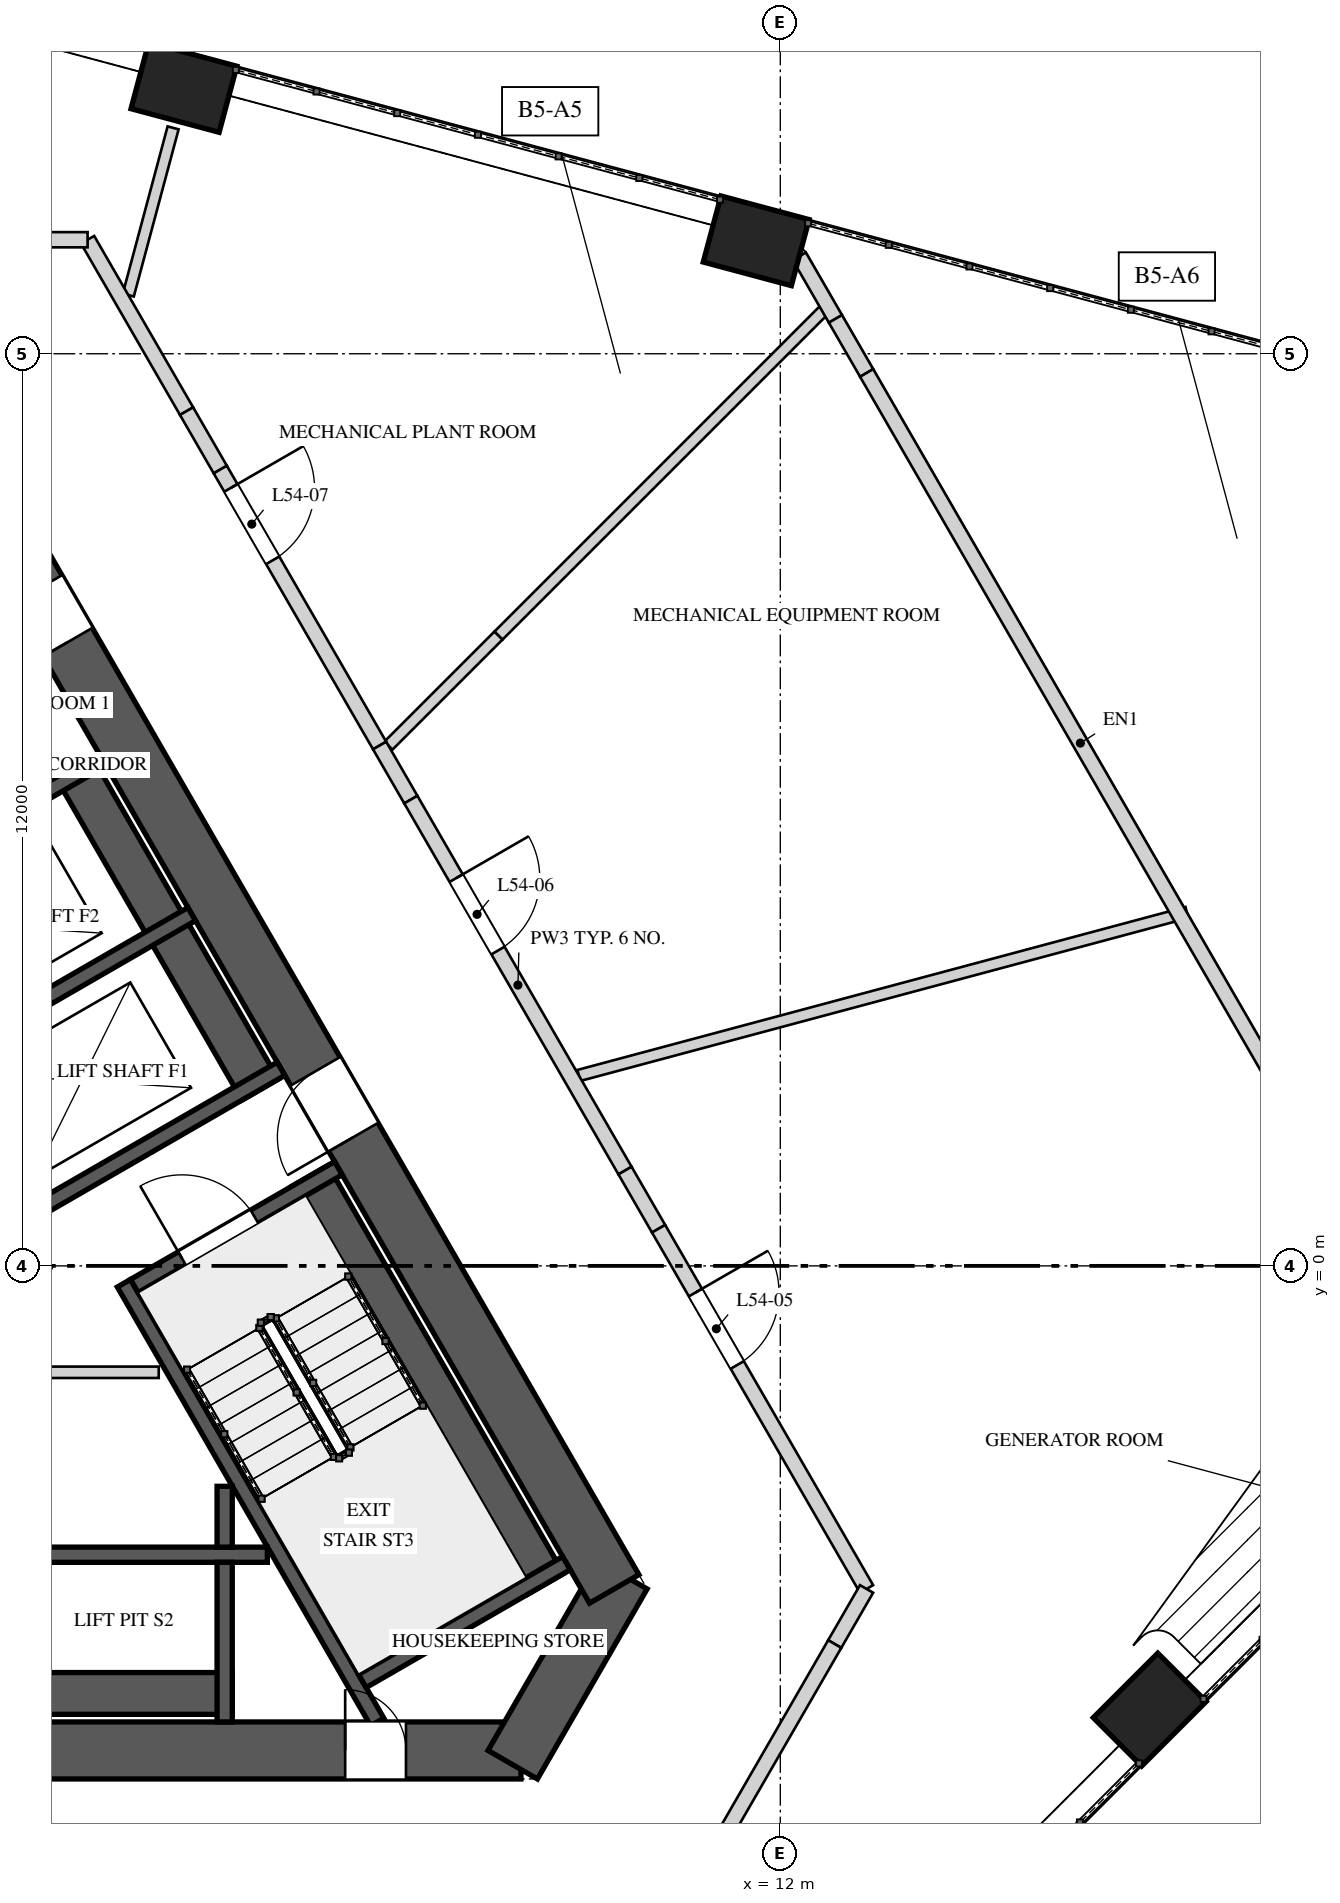
"""IFC4 building model, lengths in metres.
Left out: names, types, materials, properties, quantities, classifications, styles, units other than length and angle.
Written with IfcOpenShell. Run it as: python <this file> out.ifc"""

import sys

from ifc_helpers import new_model, si_unit, direction, frame, frame_2d, origin, origin_2d, place, context, subcontext, project, spatial, rectangle, extrude, element, fill, save


model = new_model("IFC4")
c1 = context("Model", 3, precision=1e-05, world=origin(), true_north=direction((0.0, 1.0)))
c2 = subcontext(c1, "Body", "Model", "MODEL_VIEW")
j1 = project(units=[si_unit("LENGTHUNIT", "METRE"), si_unit("PLANEANGLEUNIT", "RADIAN")], contexts=[c1])
p1 = place(None, origin())
s1 = spatial("IfcSite", under=j1, at=p1, CompositionType="ELEMENT")
p2 = place(p1, origin())
s2 = spatial("IfcBuilding", under=s1, at=p2, CompositionType="ELEMENT")
p3 = place(p2, frame((0.0, 0.0, 232.0)))
s3 = spatial("IfcBuildingStorey", under=s2, at=p3, CompositionType="ELEMENT", Elevation=232.0)
p4 = place(p3, frame((-8.588, -6.375, 0.0), z_axis=(0.0, 0.0, 1.0), x_axis=(1.0, 0.0, 0.0)))
e1 = element("IfcWall", 1, at=p4, inside=s3, PredefinedType="SHEAR", context=c2, shape_type="SweptSolid", body=[
    extrude(rectangle(XDim=17.176, YDim=0.75, at=frame_2d((8.588, 0.0))), origin(), (0.0, 0.0, 1.0), 5.2),
])
p5 = place(p4, frame((6.793, 0.0, 0.0)))
e2 = element("IfcOpeningElement", 2, at=p5, cuts=e1, PredefinedType="OPENING", context=c2, shape_type="SweptSolid", body=[
    extrude(rectangle(XDim=1.0, YDim=2.4, at=frame_2d((0.5, 1.2))), frame((0.0, 0.385, 0.0), z_axis=(0.0, -1.0, 0.0), x_axis=(1.0, 0.0, 0.0)), (0.0, 0.0, 1.0), 0.77),
])
p6 = place(p4, frame((14.864, 0.0, 0.0)))
e3 = element("IfcOpeningElement", 3, at=p6, cuts=e1, PredefinedType="OPENING", context=c2, shape_type="SweptSolid", body=[
    extrude(rectangle(XDim=0.8, YDim=2.1, at=frame_2d((0.4, 1.05))), frame((0.0, 0.385, 0.0), z_axis=(0.0, -1.0, 0.0), x_axis=(1.0, 0.0, 0.0)), (0.0, 0.0, 1.0), 0.77),
])
p7 = place(p3, frame((8.48, -6.562, 0.0), z_axis=(0.0, 0.0, 1.0), x_axis=(0.499995765644, 0.866027848477, 0.0)))
e4 = element("IfcWall", 4, at=p7, inside=s3, PredefinedType="SHEAR", context=c2, shape_type="SweptSolid", body=[
    extrude(rectangle(XDim=2.887, YDim=0.75, at=frame_2d((1.443, 0.0))), origin(), (0.0, 0.0, 1.0), 5.2),
])
p8 = place(p3, frame((9.815, -4.25, 0.0), z_axis=(0.0, 0.0, 1.0), x_axis=(-0.500002161919, 0.866024155596, 0.0)))
e5 = element("IfcWall", 5, at=p8, inside=s3, PredefinedType="SHEAR", context=c2, shape_type="SweptSolid", body=[
    extrude(rectangle(XDim=17.176, YDim=0.75, at=frame_2d((8.588, 0.0))), origin(), (0.0, 0.0, 1.0), 5.2),
])
p9 = place(p8, frame((6.863, 0.0, 0.0)))
e6 = element("IfcOpeningElement", 6, at=p9, cuts=e5, PredefinedType="OPENING", context=c2, shape_type="SweptSolid", body=[
    extrude(rectangle(XDim=1.0, YDim=2.4, at=frame_2d((0.5, 1.2))), frame((0.0, 0.385, 0.0), z_axis=(0.0, -1.0, 0.0), x_axis=(1.0, 0.0, 0.0)), (0.0, 0.0, 1.0), 0.77),
])
p10 = place(p8, frame((14.382, 0.0, 0.0)))
e7 = element("IfcOpeningElement", 7, at=p10, cuts=e5, PredefinedType="OPENING", context=c2, shape_type="SweptSolid", body=[
    extrude(rectangle(XDim=0.8, YDim=2.1, at=frame_2d((0.4, 1.05))), frame((0.0, 0.385, 0.0), z_axis=(0.0, -1.0, 0.0), x_axis=(1.0, 0.0, 0.0)), (0.0, 0.0, 1.0), 0.77),
])
for number, where, z_axis, x_axis in (
    (8, (16.86, -5.838, 0.0), (0.0, 0.0, 1.0), (0.707, 0.707, 0.0)),
    (9, (11.683, 13.486, 0.0), (0.0, 0.0, 1.0), (-0.966, 0.259, 0.0)),
    (10, (4.154, 15.503, 0.0), (0.0, 0.0, 1.0), (-0.966, 0.259, 0.0)),
):
    element("IfcColumn", number, at=place(p3, frame(where, z_axis=z_axis, x_axis=x_axis)), inside=s3, PredefinedType="COLUMN", context=c2, shape_type="SweptSolid", body=[
        extrude(rectangle(XDim=1.2, YDim=0.9, at=origin_2d()), origin(), (0.0, 0.0, 1.0), 2.806),
    ])
p11 = place(p3, frame((8.911, -4.185, 0.0), z_axis=(0.0, 0.0, 1.0), x_axis=(-0.500009909098, 0.866019682689, 0.0)))
e11 = element("IfcWall", 11, at=p11, inside=s3, PredefinedType="SOLIDWALL", context=c2, shape_type="SweptSolid", body=[
    extrude(rectangle(XDim=6.2, YDim=0.55, at=frame_2d((3.1, 0.0))), origin(), (0.0, 0.0, 1.0), 4.85),
])
p12 = place(p3, frame((6.697, -6.0, 0.0), z_axis=(0.0, 0.0, 1.0), x_axis=(-0.499980354584, 0.866036745774, 0.0)))
e12 = element("IfcWall", 12, at=p12, inside=s3, PredefinedType="SOLIDWALL", context=c2, shape_type="SweptSolid", body=[
    extrude(rectangle(XDim=6.665, YDim=0.2, at=frame_2d((3.333, 0.0))), origin(), (0.0, 0.0, 1.0), 4.85),
])
p13 = place(p3, frame((6.501, -5.461, 0.0), z_axis=(0.0, 0.0, 1.0), x_axis=(0.86600983753, 0.500026960575, 0.0)))
e13 = element("IfcWall", 13, at=p13, inside=s3, PredefinedType="SOLIDWALL", context=c2, shape_type="SweptSolid", body=[
    extrude(rectangle(XDim=3.1, YDim=0.2, at=frame_2d((1.55, 0.0))), origin(), (0.0, 0.0, 1.0), 4.85),
])
p14 = place(p3, frame((3.501, -0.265, 0.0), z_axis=(0.0, 0.0, 1.0), x_axis=(0.866043940782, 0.499967891604, 0.0)))
e14 = element("IfcWall", 14, at=p14, inside=s3, PredefinedType="SOLIDWALL", context=c2, shape_type="SweptSolid", body=[
    extrude(rectangle(XDim=3.1, YDim=0.2, at=frame_2d((1.55, 0.0))), origin(), (0.0, 0.0, 1.0), 4.85),
])
p15 = place(p14, frame((0.725, 0.0, 0.0)))
e15 = element("IfcOpeningElement", 15, at=p15, cuts=e14, PredefinedType="OPENING", context=c2, shape_type="SweptSolid", body=[
    extrude(rectangle(XDim=1.1, YDim=2.4, at=frame_2d((0.55, 1.2))), frame((0.0, 0.11, 0.0), z_axis=(0.0, -1.0, 0.0), x_axis=(1.0, 0.0, 0.0)), (0.0, 0.0, 1.0), 0.22),
])
p16 = place(p3, frame((-0.71, -3.8, 0.0), z_axis=(0.0, 0.0, 1.0), x_axis=(1.0, 0.0, 0.0)))
e16 = element("IfcWall", 16, at=p16, inside=s3, PredefinedType="SOLIDWALL", context=c2, shape_type="SweptSolid", body=[
    extrude(rectangle(XDim=5.961, YDim=0.2, at=frame_2d((2.981, 0.0))), origin(), (0.0, 0.0, 1.0), 4.85),
])
p17 = place(p3, frame((-0.71, -5.625, 0.0), z_axis=(0.0, 0.0, 1.0), x_axis=(1.0, 0.0, 0.0)))
e17 = element("IfcWall", 17, at=p17, inside=s3, PredefinedType="SOLIDWALL", context=c2, shape_type="SweptSolid", body=[
    extrude(rectangle(XDim=5.5, YDim=0.55, at=frame_2d((2.75, 0.0))), origin(), (0.0, 0.0, 1.0), 4.85),
])
p18 = place(p3, frame((4.69, -3.9, 0.0), z_axis=(0.0, 0.0, 1.0), x_axis=(0.0, -1.0, 0.0)))
e18 = element("IfcWall", 18, at=p18, inside=s3, PredefinedType="SOLIDWALL", context=c2, shape_type="SweptSolid", body=[
    extrude(rectangle(XDim=2.1, YDim=0.2, at=frame_2d((1.05, 0.0))), origin(), (0.0, 0.0, 1.0), 4.85),
])
p19 = place(p3, frame((4.69, -2.9, 0.0), z_axis=(0.0, 0.0, 1.0), x_axis=(0.0, -1.0, 0.0)))
e19 = element("IfcWall", 19, at=p19, inside=s3, PredefinedType="SOLIDWALL", context=c2, shape_type="SweptSolid", body=[
    extrude(rectangle(XDim=0.8, YDim=0.2, at=frame_2d((0.4, 0.0))), origin(), (0.0, 0.0, 1.0), 4.85),
])
p20 = place(p3, frame((5.156, 2.319, 0.0), z_axis=(0.0, 0.0, 1.0), x_axis=(-0.500018594424, 0.866014668023, 0.0)))
e20 = element("IfcWall", 20, at=p20, inside=s3, PredefinedType="SOLIDWALL", context=c2, shape_type="SweptSolid", body=[
    extrude(rectangle(XDim=4.9, YDim=0.55, at=frame_2d((2.45, 0.0))), origin(), (0.0, 0.0, 1.0), 4.85),
])
for number, where, z_axis, x_axis in (
    (21, (2.227, 0.743, 0.0), (0.0, 0.0, 1.0), (0.866, 0.5, 0.0)),
    (22, (1.052, 2.778, 0.0), (0.0, 0.0, 1.0), (0.866, 0.5, 0.0)),
):
    element("IfcWall", number, at=place(p3, frame(where, z_axis=z_axis, x_axis=x_axis)), inside=s3, PredefinedType="SOLIDWALL", context=c2, shape_type="SweptSolid", body=[
        extrude(rectangle(XDim=3.7, YDim=0.2, at=frame_2d((1.85, 0.0))), origin(), (0.0, 0.0, 1.0), 4.85),
    ])
p21 = place(p3, frame((-0.123, 4.813, 0.0), z_axis=(0.0, 0.0, 1.0), x_axis=(0.866000971088, 0.500042316284, 0.0)))
e23 = element("IfcWall", 23, at=p21, inside=s3, PredefinedType="SOLIDWALL", context=c2, shape_type="SweptSolid", body=[
    extrude(rectangle(XDim=3.7, YDim=0.2, at=frame_2d((1.85, 0.0))), origin(), (0.0, 0.0, 1.0), 4.85),
])
p22 = place(p3, frame((-4.053, -1.4, 0.0), z_axis=(0.0, 0.0, 1.0), x_axis=(1.0, 0.0, 0.0)))
e24 = element("IfcWall", 24, at=p22, inside=s3, PredefinedType="PARTITIONING", context=c2, shape_type="SweptSolid", body=[
    extrude(rectangle(XDim=7.876, YDim=0.15, at=frame_2d((3.938, 0.0))), origin(), (0.0, 0.0, 1.0), 4.85),
])
p23 = place(p3, frame((3.422, 12.772, 0.0), z_axis=(0.0, 0.0, 1.0), x_axis=(0.258796817064, 0.965931782, 0.0)))
e25 = element("IfcWall", 25, at=p23, inside=s3, PredefinedType="PARTITIONING", context=c2, shape_type="SweptSolid", body=[
    extrude(rectangle(XDim=2.277, YDim=0.15, at=frame_2d((1.139, 0.0))), origin(), (0.0, 0.0, 1.0), 4.85),
])
p24 = place(p3, frame((6.845, 6.845, 0.0), z_axis=(0.0, 0.0, 1.0), x_axis=(0.707106781187, 0.707106781187, 0.0)))
e26 = element("IfcWall", 26, at=p24, inside=s3, PredefinedType="PARTITIONING", context=c2, shape_type="SweptSolid", body=[
    extrude(rectangle(XDim=2.049, YDim=0.15, at=frame_2d((1.024, 0.0))), origin(), (0.0, 0.0, 1.0), 3.95),
])
p25 = place(p3, frame((8.293, 8.293, 0.0), z_axis=(0.0, 0.0, 1.0), x_axis=(0.707106781187, 0.707106781187, 0.0)))
e27 = element("IfcWall", 27, at=p25, inside=s3, PredefinedType="PARTITIONING", context=c2, shape_type="SweptSolid", body=[
    extrude(rectangle(XDim=6.17, YDim=0.15, at=frame_2d((3.085, 0.0))), origin(), (0.0, 0.0, 1.0), 4.85),
])
p26 = place(p3, frame((9.35, 2.505, 0.0), z_axis=(0.0, 0.0, 1.0), x_axis=(0.965925024381, 0.258822037845, 0.0)))
e28 = element("IfcWall", 28, at=p26, inside=s3, PredefinedType="PARTITIONING", context=c2, shape_type="SweptSolid", body=[
    extrude(rectangle(XDim=8.282, YDim=0.15, at=frame_2d((4.141, 0.0))), origin(), (0.0, 0.0, 1.0), 4.85),
])
p27 = place(p3, frame((2.887, 13.5, 0.0), z_axis=(0.0, 0.0, 1.0), x_axis=(0.500001094379, -0.866024771944, 0.0)))
e29 = element("IfcWall", 29, at=p27, inside=s3, PredefinedType="SOLIDWALL", context=c2, shape_type="SweptSolid", body=[
    extrude(rectangle(XDim=2.604, YDim=0.2, at=frame_2d((1.302, 0.0))), origin(), (0.0, 0.0, 1.0), 4.85),
])
p28 = place(p3, frame((4.189, 11.245, 0.0), z_axis=(0.0, 0.0, 1.0), x_axis=(0.500016243463, -0.866016025414, 0.0)))
e30 = element("IfcWall", 30, at=p28, inside=s3, PredefinedType="SOLIDWALL", context=c2, shape_type="SweptSolid", body=[
    extrude(rectangle(XDim=0.887, YDim=0.2, at=frame_2d((0.444, 0.0))), origin(), (0.0, 0.0, 1.0), 4.15),
])
p29 = place(p3, frame((4.632, 10.477, 0.0), z_axis=(0.0, 0.0, 1.0), x_axis=(0.499984573973, -0.866034309822, 0.0)))
e31 = element("IfcWall", 31, at=p29, inside=s3, PredefinedType="SOLIDWALL", context=c2, shape_type="SweptSolid", body=[
    extrude(rectangle(XDim=4.193, YDim=0.2, at=frame_2d((2.096, 0.0))), origin(), (0.0, 0.0, 1.0), 4.85),
])
p30 = place(p29, frame((0.279, 0.0, 0.0)))
e32 = element("IfcOpeningElement", 32, at=p30, cuts=e31, PredefinedType="OPENING", context=c2, shape_type="SweptSolid", body=[
    extrude(rectangle(XDim=1.1, YDim=2.2, at=frame_2d((0.55, 1.1))), frame((0.0, 0.11, 0.0), z_axis=(0.0, -1.0, 0.0), x_axis=(1.0, 0.0, 0.0)), (0.0, 0.0, 1.0), 0.22),
])
p31 = place(p3, frame((6.729, 6.846, 0.0), z_axis=(0.0, 0.0, 1.0), x_axis=(0.500039835994, -0.866002403241, 0.0)))
e33 = element("IfcWall", 33, at=p31, inside=s3, PredefinedType="SOLIDWALL", context=c2, shape_type="SweptSolid", body=[
    extrude(rectangle(XDim=0.821, YDim=0.2, at=frame_2d((0.411, 0.0))), origin(), (0.0, 0.0, 1.0), 3.95),
])
p32 = place(p3, frame((7.139, 6.135, 0.0), z_axis=(0.0, 0.0, 1.0), x_axis=(0.500006198144, -0.866021825255, 0.0)))
e34 = element("IfcWall", 34, at=p32, inside=s3, PredefinedType="SOLIDWALL", context=c2, shape_type="SweptSolid", body=[
    extrude(rectangle(XDim=5.636, YDim=0.2, at=frame_2d((2.818, 0.0))), origin(), (0.0, 0.0, 1.0), 4.85),
])
p33 = place(p32, frame((1.193, 0.0, 0.0)))
e35 = element("IfcOpeningElement", 35, at=p33, cuts=e34, PredefinedType="OPENING", context=c2, shape_type="SweptSolid", body=[
    extrude(rectangle(XDim=1.1, YDim=2.2, at=frame_2d((0.55, 1.1))), frame((0.0, 0.11, 0.0), z_axis=(0.0, -1.0, 0.0), x_axis=(1.0, 0.0, 0.0)), (0.0, 0.0, 1.0), 0.22),
])
p34 = place(p3, frame((9.957, 1.254, 0.0), z_axis=(0.0, 0.0, 1.0), x_axis=(0.499913830031, -0.866075148324, 0.0)))
e36 = element("IfcWall", 36, at=p34, inside=s3, PredefinedType="SOLIDWALL", context=c2, shape_type="SweptSolid", body=[
    extrude(rectangle(XDim=0.884, YDim=0.2, at=frame_2d((0.442, 0.0))), origin(), (0.0, 0.0, 1.0), 3.95),
])
p35 = place(p3, frame((10.399, 0.489, 0.0), z_axis=(0.0, 0.0, 1.0), x_axis=(0.500021123982, -0.866013207504, 0.0)))
e37 = element("IfcWall", 37, at=p35, inside=s3, PredefinedType="SOLIDWALL", context=c2, shape_type="SweptSolid", body=[
    extrude(rectangle(XDim=5.472, YDim=0.2, at=frame_2d((2.736, 0.0))), origin(), (0.0, 0.0, 1.0), 4.85),
])
p36 = place(p35, frame((0.97, 0.0, 0.0)))
e38 = element("IfcOpeningElement", 38, at=p36, cuts=e37, PredefinedType="OPENING", context=c2, shape_type="SweptSolid", body=[
    extrude(rectangle(XDim=1.1, YDim=2.2, at=frame_2d((0.55, 1.1))), frame((0.0, 0.11, 0.0), z_axis=(0.0, -1.0, 0.0), x_axis=(1.0, 0.0, 0.0)), (0.0, 0.0, 1.0), 0.22),
])
p37 = place(p3, frame((13.135, -4.25, 0.0), z_axis=(0.0, 0.0, 1.0), x_axis=(-0.499966538646, -0.866044721844, 0.0)))
e39 = element("IfcWall", 39, at=p37, inside=s3, PredefinedType="SOLIDWALL", context=c2, shape_type="SweptSolid", body=[
    extrude(rectangle(XDim=0.837, YDim=0.2, at=frame_2d((0.418, 0.0))), origin(), (0.0, 0.0, 1.0), 4.15),
])
p38 = place(p3, frame((12.716, -4.975, 0.0), z_axis=(0.0, 0.0, 1.0), x_axis=(-0.500000720929, -0.866024987556, 0.0)))
e40 = element("IfcWall", 40, at=p38, inside=s3, PredefinedType="SOLIDWALL", context=c2, shape_type="SweptSolid", body=[
    extrude(rectangle(XDim=4.937, YDim=0.2, at=frame_2d((2.468, 0.0))), origin(), (0.0, 0.0, 1.0), 4.85),
])
p39 = place(p3, frame((-2.05, 13.5, 0.0), z_axis=(0.0, 0.0, 1.0), x_axis=(1.0, 0.0, 0.0)))
e41 = element("IfcWall", 41, at=p39, inside=s3, PredefinedType="SOLIDWALL", context=c2, shape_type="SweptSolid", body=[
    extrude(rectangle(XDim=4.937, YDim=0.2, at=frame_2d((2.468, 0.0))), origin(), (0.0, 0.0, 1.0), 4.85),
])
p40 = place(p39, frame((1.5, 0.0, 0.0)))
e42 = element("IfcOpeningElement", 42, at=p40, cuts=e41, PredefinedType="OPENING", context=c2, shape_type="SweptSolid", body=[
    extrude(rectangle(XDim=1.1, YDim=2.2, at=frame_2d((0.55, 1.1))), frame((0.0, 0.11, 0.0), z_axis=(0.0, -1.0, 0.0), x_axis=(1.0, 0.0, 0.0)), (0.0, 0.0, 1.0), 0.22),
])
p41 = place(p3, frame((12.25, 13.282, 0.0), z_axis=(0.0, 0.0, 1.0), x_axis=(0.499952260202, -0.866052964615, 0.0)))
e43 = element("IfcWall", 43, at=p41, inside=s3, PredefinedType="SOLIDWALL", context=c2, shape_type="SweptSolid", body=[
    extrude(rectangle(XDim=0.95, YDim=0.2, at=frame_2d((0.475, 0.0))), origin(), (0.0, 0.0, 1.0), 4.85),
])
p42 = place(p3, frame((12.725, 12.459, 0.0), z_axis=(0.0, 0.0, 1.0), x_axis=(0.500134012897, -0.865948017576, 0.0)))
e44 = element("IfcWall", 44, at=p42, inside=s3, PredefinedType="SOLIDWALL", context=c2, shape_type="SweptSolid", body=[
    extrude(rectangle(XDim=0.822, YDim=0.2, at=frame_2d((0.411, 0.0))), origin(), (0.0, 0.0, 1.0), 3.95),
])
p43 = place(p3, frame((13.136, 11.748, 0.0), z_axis=(0.0, 0.0, 1.0), x_axis=(0.499993666936, -0.86602906015, 0.0)))
e45 = element("IfcWall", 45, at=p43, inside=s3, PredefinedType="SOLIDWALL", context=c2, shape_type="SweptSolid", body=[
    extrude(rectangle(XDim=11.247, YDim=0.2, at=frame_2d((5.624, 0.0))), origin(), (0.0, 0.0, 1.0), 4.85),
])
p44 = place(p15, origin())
e46 = element("IfcDoor", 46, at=p44, inside=s3, OperationType="SINGLE_SWING_RIGHT", PredefinedType="DOOR", context=c2, shape_type="SweptSolid", body=[
    extrude(rectangle(XDim=1.1, YDim=2.4, at=frame_2d((0.55, 1.2))), frame((0.0, 0.025, 0.0), z_axis=(0.0, -1.0, 0.0), x_axis=(1.0, 0.0, 0.0)), (0.0, 0.0, 1.0), 0.05),
])
fill(e15, e46)
p45 = place(p9, origin())
e47 = element("IfcDoor", 47, at=p45, inside=s3, OperationType="SINGLE_SWING_RIGHT", PredefinedType="DOOR", context=c2, shape_type="SweptSolid", body=[
    extrude(rectangle(XDim=1.0, YDim=2.4, at=frame_2d((0.5, 1.2))), frame((0.0, 0.025, 0.0), z_axis=(0.0, -1.0, 0.0), x_axis=(1.0, 0.0, 0.0)), (0.0, 0.0, 1.0), 0.05),
])
fill(e6, e47)
p46 = place(p6, origin())
e48 = element("IfcDoor", 48, at=p46, inside=s3, OperationType="SINGLE_SWING_LEFT", PredefinedType="DOOR", context=c2, shape_type="SweptSolid", body=[
    extrude(rectangle(XDim=0.8, YDim=2.1, at=frame_2d((0.4, 1.05))), frame((0.0, 0.025, 0.0), z_axis=(0.0, -1.0, 0.0), x_axis=(1.0, 0.0, 0.0)), (0.0, 0.0, 1.0), 0.05),
])
fill(e3, e48)
p47 = place(p10, origin())
e49 = element("IfcDoor", 49, at=p47, inside=s3, OperationType="SINGLE_SWING_RIGHT", PredefinedType="DOOR", context=c2, shape_type="SweptSolid", body=[
    extrude(rectangle(XDim=0.8, YDim=2.1, at=frame_2d((0.4, 1.05))), frame((0.0, 0.025, 0.0), z_axis=(0.0, -1.0, 0.0), x_axis=(1.0, 0.0, 0.0)), (0.0, 0.0, 1.0), 0.05),
])
fill(e7, e49)
p48 = place(p36, origin())
e50 = element("IfcDoor", 50, at=p48, inside=s3, OperationType="SINGLE_SWING_LEFT", PredefinedType="DOOR", context=c2, shape_type="SweptSolid", body=[
    extrude(rectangle(XDim=1.1, YDim=2.2, at=frame_2d((0.55, 1.1))), frame((0.0, 0.025, 0.0), z_axis=(0.0, -1.0, 0.0), x_axis=(1.0, 0.0, 0.0)), (0.0, 0.0, 1.0), 0.05),
])
fill(e38, e50)
p49 = place(p33, origin())
e51 = element("IfcDoor", 51, at=p49, inside=s3, OperationType="SINGLE_SWING_RIGHT", PredefinedType="DOOR", context=c2, shape_type="SweptSolid", body=[
    extrude(rectangle(XDim=1.1, YDim=2.2, at=frame_2d((0.55, 1.1))), frame((0.0, 0.025, 0.0), z_axis=(0.0, -1.0, 0.0), x_axis=(1.0, 0.0, 0.0)), (0.0, 0.0, 1.0), 0.05),
])
fill(e35, e51)
p50 = place(p30, origin())
e52 = element("IfcDoor", 52, at=p50, inside=s3, OperationType="SINGLE_SWING_LEFT", PredefinedType="DOOR", context=c2, shape_type="SweptSolid", body=[
    extrude(rectangle(XDim=1.1, YDim=2.2, at=frame_2d((0.55, 1.1))), frame((0.0, 0.025, 0.0), z_axis=(0.0, -1.0, 0.0), x_axis=(1.0, 0.0, 0.0)), (0.0, 0.0, 1.0), 0.05),
])
fill(e32, e52)
save(model, sys.argv[1])
